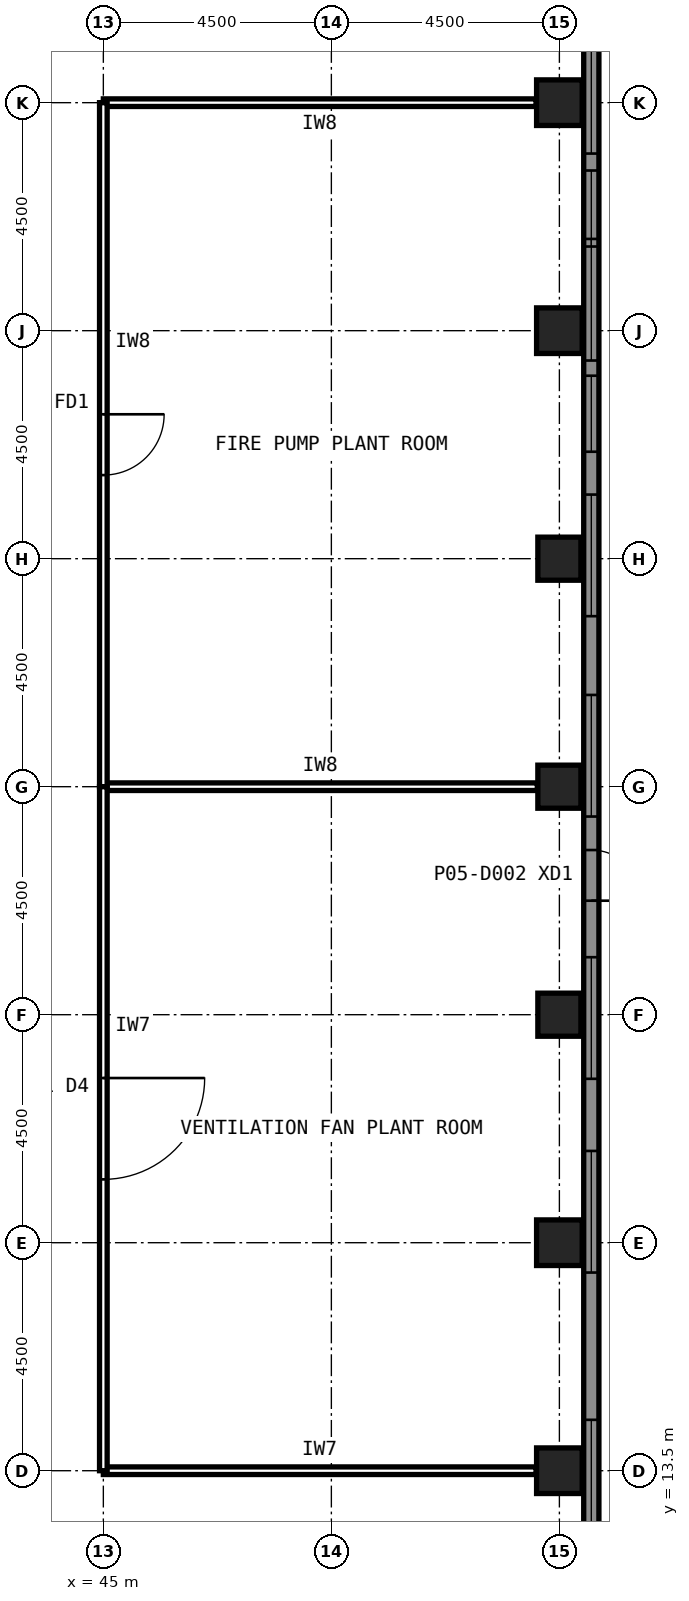
"""IFC4 building model, lengths in metres.
Left out: names, types, materials, properties, quantities, classifications, styles, units other than length and angle.
Written with IfcOpenShell. Run it as: python <this file> out.ifc"""

import sys

from ifc_helpers import new_model, si_unit, direction, frame, frame_2d, origin, origin_2d, place, context, subcontext, project, spatial, rectangle, hollow_rectangle, extrude, element, fill, save


model = new_model("IFC4")
c1 = context("Model", 3, precision=1e-05, world=origin(), true_north=direction((0.0, 1.0)))
c2 = subcontext(c1, "Body", "Model", "MODEL_VIEW")
j1 = project(units=[si_unit("LENGTHUNIT", "METRE"), si_unit("PLANEANGLEUNIT", "RADIAN")], contexts=[c1])
p1 = place(None, origin())
s1 = spatial("IfcSite", under=j1, at=p1, CompositionType="ELEMENT")
p2 = place(p1, origin())
s2 = spatial("IfcBuilding", under=s1, at=p2, CompositionType="ELEMENT")
p3 = place(p2, frame((0.0, 0.0, 23.0)))
s3 = spatial("IfcBuildingStorey", under=s2, at=p3, CompositionType="ELEMENT", Elevation=23.0)
for number, where, z_axis, x_axis in (
    (1, (54.0, 13.5, 0.0), (0.0, 0.0, 1.0), (1.0, 0.0, 0.0)),
    (2, (54.0, 18.0, 0.0), (0.0, 0.0, 1.0), (1.0, 0.0, 0.0)),
):
    element("IfcColumn", number, at=place(p3, frame(where, z_axis=z_axis, x_axis=x_axis)), inside=s3, PredefinedType="COLUMN", context=c2, shape_type="SweptSolid", body=[
        extrude(hollow_rectangle(XDim=0.9, YDim=0.9, WallThickness=0.063, at=origin_2d()), origin(), (0.0, 0.0, 1.0), 6.0),
    ])
for number, where, z_axis, x_axis in (
    (3, (54.0, 22.5, 0.0), (0.0, 0.0, 1.0), (1.0, 0.0, 0.0)),
    (4, (54.0, 27.0, 0.0), (0.0, 0.0, 1.0), (1.0, 0.0, 0.0)),
    (5, (54.0, 31.5, 0.0), (0.0, 0.0, 1.0), (1.0, 0.0, 0.0)),
):
    element("IfcColumn", number, at=place(p3, frame(where, z_axis=z_axis, x_axis=x_axis)), inside=s3, PredefinedType="COLUMN", context=c2, shape_type="SweptSolid", body=[
        extrude(hollow_rectangle(XDim=0.85, YDim=0.85, WallThickness=0.05, at=origin_2d()), origin(), (0.0, 0.0, 1.0), 6.0),
    ])
for number, where, z_axis, x_axis in (
    (6, (54.0, 36.0, 0.0), (0.0, 0.0, 1.0), (1.0, 0.0, 0.0)),
    (7, (54.0, 40.5, 0.0), (0.0, 0.0, 1.0), (1.0, 0.0, 0.0)),
):
    element("IfcColumn", number, at=place(p3, frame(where, z_axis=z_axis, x_axis=x_axis)), inside=s3, PredefinedType="COLUMN", context=c2, shape_type="SweptSolid", body=[
        extrude(hollow_rectangle(XDim=0.9, YDim=0.9, WallThickness=0.063, at=origin_2d()), origin(), (0.0, 0.0, 1.0), 6.0),
    ])
p4 = place(p3, frame((54.63, 45.261, 0.0), z_axis=(0.0, 0.0, 1.0), x_axis=(0.0, -1.0, 0.0)))
e8 = element("IfcWall", 8, at=p4, inside=s3, PredefinedType="SOLIDWALL", context=c2, shape_type="SweptSolid", body=[
    extrude(rectangle(XDim=36.522, YDim=0.3, at=frame_2d((18.261, 0.0))), origin(), (0.0, 0.0, 1.0), 6.0),
])
p5 = place(p4, frame((19.511, 0.0, 0.0)))
e9 = element("IfcOpeningElement", 9, at=p5, cuts=e8, PredefinedType="OPENING", context=c2, shape_type="SweptSolid", body=[
    extrude(rectangle(XDim=1.0, YDim=2.1, at=frame_2d((0.5, 1.05))), frame((0.0, 0.16, 0.0), z_axis=(0.0, -1.0, 0.0), x_axis=(1.0, 0.0, 0.0)), (0.0, 0.0, 1.0), 0.32),
])
p6 = place(p4, frame((0.3, 0.0, 0.3)))
e10 = element("IfcOpeningElement", 10, at=p6, cuts=e8, PredefinedType="OPENING", context=c2, shape_type="SweptSolid", body=[
    extrude(rectangle(XDim=1.5, YDim=2.0, at=frame_2d((0.75, 1.0))), frame((0.0, 0.16, 0.0), z_axis=(0.0, -1.0, 0.0), x_axis=(1.0, 0.0, 0.0)), (0.0, 0.0, 1.0), 0.32),
])
p7 = place(p4, frame((3.365, 0.0, 1.2)))
e11 = element("IfcOpeningElement", 11, at=p7, cuts=e8, PredefinedType="OPENING", context=c2, shape_type="SweptSolid", body=[
    extrude(rectangle(XDim=2.4, YDim=3.0, at=frame_2d((1.2, 1.5))), frame((0.0, 0.16, 0.0), z_axis=(0.0, -1.0, 0.0), x_axis=(1.0, 0.0, 0.0)), (0.0, 0.0, 1.0), 0.32),
])
p8 = place(p4, frame((1.5, 0.0, 3.65)))
e12 = element("IfcOpeningElement", 12, at=p8, cuts=e8, PredefinedType="OPENING", context=c2, shape_type="SweptSolid", body=[
    extrude(rectangle(XDim=1.5, YDim=2.0, at=frame_2d((0.75, 1.0))), frame((0.0, 0.16, 0.0), z_axis=(0.0, -1.0, 0.0), x_axis=(1.0, 0.0, 0.0)), (0.0, 0.0, 1.0), 0.32),
])
p9 = place(p4, frame((6.1, 0.0, 3.6)))
e13 = element("IfcOpeningElement", 13, at=p9, cuts=e8, PredefinedType="OPENING", context=c2, shape_type="SweptSolid", body=[
    extrude(rectangle(XDim=1.5, YDim=2.0, at=frame_2d((0.75, 1.0))), frame((0.0, 0.16, 0.0), z_axis=(0.0, -1.0, 0.0), x_axis=(1.0, 0.0, 0.0)), (0.0, 0.0, 1.0), 0.32),
])
p10 = place(p4, frame((12.496, 0.0, 1.2)))
e14 = element("IfcOpeningElement", 14, at=p10, cuts=e8, PredefinedType="OPENING", context=c2, shape_type="SweptSolid", body=[
    extrude(rectangle(XDim=2.4, YDim=3.0, at=frame_2d((1.2, 1.5))), frame((0.0, 0.16, 0.0), z_axis=(0.0, -1.0, 0.0), x_axis=(1.0, 0.0, 0.0)), (0.0, 0.0, 1.0), 0.32),
])
p11 = place(p4, frame((7.45, 0.0, 0.3)))
e15 = element("IfcOpeningElement", 15, at=p11, cuts=e8, PredefinedType="OPENING", context=c2, shape_type="SweptSolid", body=[
    extrude(rectangle(XDim=2.4, YDim=3.0, at=frame_2d((1.2, 1.5))), frame((0.0, 0.16, 0.0), z_axis=(0.0, -1.0, 0.0), x_axis=(1.0, 0.0, 0.0)), (0.0, 0.0, 1.0), 0.32),
])
p12 = place(p4, frame((21.626, 0.0, 1.2)))
e16 = element("IfcOpeningElement", 16, at=p12, cuts=e8, PredefinedType="OPENING", context=c2, shape_type="SweptSolid", body=[
    extrude(rectangle(XDim=2.4, YDim=3.0, at=frame_2d((1.2, 1.5))), frame((0.0, 0.16, 0.0), z_axis=(0.0, -1.0, 0.0), x_axis=(1.0, 0.0, 0.0)), (0.0, 0.0, 1.0), 0.32),
])
p13 = place(p4, frame((10.15, 0.0, 0.3)))
e17 = element("IfcOpeningElement", 17, at=p13, cuts=e8, PredefinedType="OPENING", context=c2, shape_type="SweptSolid", body=[
    extrude(rectangle(XDim=1.5, YDim=2.0, at=frame_2d((0.75, 1.0))), frame((0.0, 0.16, 0.0), z_axis=(0.0, -1.0, 0.0), x_axis=(1.0, 0.0, 0.0)), (0.0, 0.0, 1.0), 0.32),
])
p14 = place(p4, frame((16.45, 0.0, 0.3)))
e18 = element("IfcOpeningElement", 18, at=p14, cuts=e8, PredefinedType="OPENING", context=c2, shape_type="SweptSolid", body=[
    extrude(rectangle(XDim=2.4, YDim=3.0, at=frame_2d((1.2, 1.5))), frame((0.0, 0.16, 0.0), z_axis=(0.0, -1.0, 0.0), x_axis=(1.0, 0.0, 0.0)), (0.0, 0.0, 1.0), 0.32),
])
p15 = place(p4, frame((30.757, 0.0, 1.2)))
e19 = element("IfcOpeningElement", 19, at=p15, cuts=e8, PredefinedType="OPENING", context=c2, shape_type="SweptSolid", body=[
    extrude(rectangle(XDim=2.4, YDim=3.0, at=frame_2d((1.2, 1.5))), frame((0.0, 0.16, 0.0), z_axis=(0.0, -1.0, 0.0), x_axis=(1.0, 0.0, 0.0)), (0.0, 0.0, 1.0), 0.32),
])
p16 = place(p4, frame((25.45, 0.0, 0.3)))
e20 = element("IfcOpeningElement", 20, at=p16, cuts=e8, PredefinedType="OPENING", context=c2, shape_type="SweptSolid", body=[
    extrude(rectangle(XDim=2.4, YDim=3.0, at=frame_2d((1.2, 1.5))), frame((0.0, 0.16, 0.0), z_axis=(0.0, -1.0, 0.0), x_axis=(1.0, 0.0, 0.0)), (0.0, 0.0, 1.0), 0.32),
])
p17 = place(p3, frame((45.0, 27.0, 0.0), z_axis=(0.0, 0.0, 1.0), x_axis=(1.0, 0.0, 0.0)))
e21 = element("IfcWall", 21, at=p17, inside=s3, PredefinedType="PARTITIONING", context=c2, shape_type="SweptSolid", body=[
    extrude(rectangle(XDim=8.565, YDim=0.15, at=frame_2d((4.282, 0.0))), origin(), (0.0, 0.0, 1.0), 4.989),
])
p18 = place(p3, frame((53.54, 40.5, 0.0), z_axis=(0.0, 0.0, 1.0), x_axis=(-1.0, 0.0, 0.0)))
e22 = element("IfcWall", 22, at=p18, inside=s3, PredefinedType="PARTITIONING", context=c2, shape_type="SweptSolid", body=[
    extrude(rectangle(XDim=8.54, YDim=0.15, at=frame_2d((4.27, 0.0))), origin(), (0.0, 0.0, 1.0), 4.989),
])
p19 = place(p3, frame((45.0, 40.5, 0.0), z_axis=(0.0, 0.0, 1.0), x_axis=(0.0, -1.0, 0.0)))
e23 = element("IfcWall", 23, at=p19, inside=s3, PredefinedType="PARTITIONING", context=c2, shape_type="SweptSolid", body=[
    extrude(rectangle(XDim=13.5, YDim=0.15, at=frame_2d((6.75, 0.0))), origin(), (0.0, 0.0, 1.0), 5.84),
])
p20 = place(p19, frame((6.15, 0.0, 0.0)))
e24 = element("IfcOpeningElement", 24, at=p20, cuts=e23, PredefinedType="OPENING", context=c2, shape_type="SweptSolid", body=[
    extrude(rectangle(XDim=1.2, YDim=2.1, at=frame_2d((0.6, 1.05))), frame((0.0, 0.085, 0.0), z_axis=(0.0, -1.0, 0.0), x_axis=(1.0, 0.0, 0.0)), (0.0, 0.0, 1.0), 0.17),
])
p21 = place(p3, frame((45.0, 13.5, 0.0), z_axis=(0.0, 0.0, 1.0), x_axis=(1.0, 0.0, 0.0)))
e25 = element("IfcWall", 25, at=p21, inside=s3, PredefinedType="PARTITIONING", context=c2, shape_type="SweptSolid", body=[
    extrude(rectangle(XDim=8.54, YDim=0.15, at=frame_2d((4.27, 0.0))), origin(), (0.0, 0.0, 1.0), 4.989),
])
p22 = place(p3, frame((45.0, 27.0, 0.0), z_axis=(0.0, 0.0, 1.0), x_axis=(0.0, -1.0, 0.0)))
e26 = element("IfcWall", 26, at=p22, inside=s3, PredefinedType="PARTITIONING", context=c2, shape_type="SweptSolid", body=[
    extrude(rectangle(XDim=13.5, YDim=0.15, at=frame_2d((6.75, 0.0))), origin(), (0.0, 0.0, 1.0), 5.84),
])
p23 = place(p22, frame((5.75, 0.0, 0.0)))
e27 = element("IfcOpeningElement", 27, at=p23, cuts=e26, PredefinedType="OPENING", context=c2, shape_type="SweptSolid", body=[
    extrude(rectangle(XDim=2.0, YDim=2.4, at=frame_2d((1.0, 1.2))), frame((0.0, 0.085, 0.0), z_axis=(0.0, -1.0, 0.0), x_axis=(1.0, 0.0, 0.0)), (0.0, 0.0, 1.0), 0.17),
])
p24 = place(p5, origin())
e28 = element("IfcDoor", 28, at=p24, inside=s3, OperationType="SINGLE_SWING_RIGHT", PredefinedType="DOOR", context=c2, shape_type="SweptSolid", body=[
    extrude(rectangle(XDim=1.0, YDim=2.1, at=frame_2d((0.5, 1.05))), frame((0.0, 0.025, 0.0), z_axis=(0.0, -1.0, 0.0), x_axis=(1.0, 0.0, 0.0)), (0.0, 0.0, 1.0), 0.05),
])
fill(e9, e28)
p25 = place(p7, origin())
e29 = element("IfcWindow", 29, at=p25, inside=s3, PartitioningType="SINGLE_PANEL", PredefinedType="USERDEFINED", context=c2, shape_type="SweptSolid", body=[
    extrude(rectangle(XDim=2.4, YDim=3.0, at=frame_2d((1.2, 1.5))), frame((0.0, 0.03, 0.0), z_axis=(0.0, -1.0, 0.0), x_axis=(1.0, 0.0, 0.0)), (0.0, 0.0, 1.0), 0.06),
])
fill(e11, e29)
p26 = place(p9, origin())
e30 = element("IfcWindow", 30, at=p26, inside=s3, PartitioningType="SINGLE_PANEL", PredefinedType="USERDEFINED", context=c2, shape_type="SweptSolid", body=[
    extrude(rectangle(XDim=1.5, YDim=2.0, at=frame_2d((0.75, 1.0))), frame((0.0, 0.03, 0.0), z_axis=(0.0, -1.0, 0.0), x_axis=(1.0, 0.0, 0.0)), (0.0, 0.0, 1.0), 0.06),
])
fill(e13, e30)
p27 = place(p10, origin())
e31 = element("IfcWindow", 31, at=p27, inside=s3, PartitioningType="SINGLE_PANEL", PredefinedType="USERDEFINED", context=c2, shape_type="SweptSolid", body=[
    extrude(rectangle(XDim=2.4, YDim=3.0, at=frame_2d((1.2, 1.5))), frame((0.0, 0.03, 0.0), z_axis=(0.0, -1.0, 0.0), x_axis=(1.0, 0.0, 0.0)), (0.0, 0.0, 1.0), 0.06),
])
fill(e14, e31)
p28 = place(p11, origin())
e32 = element("IfcWindow", 32, at=p28, inside=s3, PartitioningType="SINGLE_PANEL", PredefinedType="USERDEFINED", context=c2, shape_type="SweptSolid", body=[
    extrude(rectangle(XDim=2.4, YDim=3.0, at=frame_2d((1.2, 1.5))), frame((0.0, 0.03, 0.0), z_axis=(0.0, -1.0, 0.0), x_axis=(1.0, 0.0, 0.0)), (0.0, 0.0, 1.0), 0.06),
])
fill(e15, e32)
p29 = place(p12, origin())
e33 = element("IfcWindow", 33, at=p29, inside=s3, PartitioningType="SINGLE_PANEL", PredefinedType="USERDEFINED", context=c2, shape_type="SweptSolid", body=[
    extrude(rectangle(XDim=2.4, YDim=3.0, at=frame_2d((1.2, 1.5))), frame((0.0, 0.03, 0.0), z_axis=(0.0, -1.0, 0.0), x_axis=(1.0, 0.0, 0.0)), (0.0, 0.0, 1.0), 0.06),
])
fill(e16, e33)
p30 = place(p13, origin())
e34 = element("IfcWindow", 34, at=p30, inside=s3, PartitioningType="SINGLE_PANEL", PredefinedType="USERDEFINED", context=c2, shape_type="SweptSolid", body=[
    extrude(rectangle(XDim=1.5, YDim=2.0, at=frame_2d((0.75, 1.0))), frame((0.0, 0.03, 0.0), z_axis=(0.0, -1.0, 0.0), x_axis=(1.0, 0.0, 0.0)), (0.0, 0.0, 1.0), 0.06),
])
fill(e17, e34)
p31 = place(p14, origin())
e35 = element("IfcWindow", 35, at=p31, inside=s3, PartitioningType="SINGLE_PANEL", PredefinedType="USERDEFINED", context=c2, shape_type="SweptSolid", body=[
    extrude(rectangle(XDim=2.4, YDim=3.0, at=frame_2d((1.2, 1.5))), frame((0.0, 0.03, 0.0), z_axis=(0.0, -1.0, 0.0), x_axis=(1.0, 0.0, 0.0)), (0.0, 0.0, 1.0), 0.06),
])
fill(e18, e35)
p32 = place(p15, origin())
e36 = element("IfcWindow", 36, at=p32, inside=s3, PartitioningType="SINGLE_PANEL", PredefinedType="USERDEFINED", context=c2, shape_type="SweptSolid", body=[
    extrude(rectangle(XDim=2.4, YDim=3.0, at=frame_2d((1.2, 1.5))), frame((0.0, 0.03, 0.0), z_axis=(0.0, -1.0, 0.0), x_axis=(1.0, 0.0, 0.0)), (0.0, 0.0, 1.0), 0.06),
])
fill(e19, e36)
p33 = place(p16, origin())
e37 = element("IfcWindow", 37, at=p33, inside=s3, PartitioningType="SINGLE_PANEL", PredefinedType="USERDEFINED", context=c2, shape_type="SweptSolid", body=[
    extrude(rectangle(XDim=2.4, YDim=3.0, at=frame_2d((1.2, 1.5))), frame((0.0, 0.03, 0.0), z_axis=(0.0, -1.0, 0.0), x_axis=(1.0, 0.0, 0.0)), (0.0, 0.0, 1.0), 0.06),
])
fill(e20, e37)
p34 = place(p20, origin())
e38 = element("IfcDoor", 38, at=p34, inside=s3, OperationType="SINGLE_SWING_LEFT", PredefinedType="DOOR", context=c2, shape_type="SweptSolid", body=[
    extrude(rectangle(XDim=1.2, YDim=2.1, at=frame_2d((0.6, 1.05))), frame((0.0, 0.025, 0.0), z_axis=(0.0, -1.0, 0.0), x_axis=(1.0, 0.0, 0.0)), (0.0, 0.0, 1.0), 0.05),
])
fill(e24, e38)
p35 = place(p23, origin())
e39 = element("IfcDoor", 39, at=p35, inside=s3, OperationType="SINGLE_SWING_LEFT", PredefinedType="DOOR", context=c2, shape_type="SweptSolid", body=[
    extrude(rectangle(XDim=2.0, YDim=2.4, at=frame_2d((1.0, 1.2))), frame((0.0, 0.025, 0.0), z_axis=(0.0, -1.0, 0.0), x_axis=(1.0, 0.0, 0.0)), (0.0, 0.0, 1.0), 0.05),
])
fill(e27, e39)
save(model, sys.argv[1])
